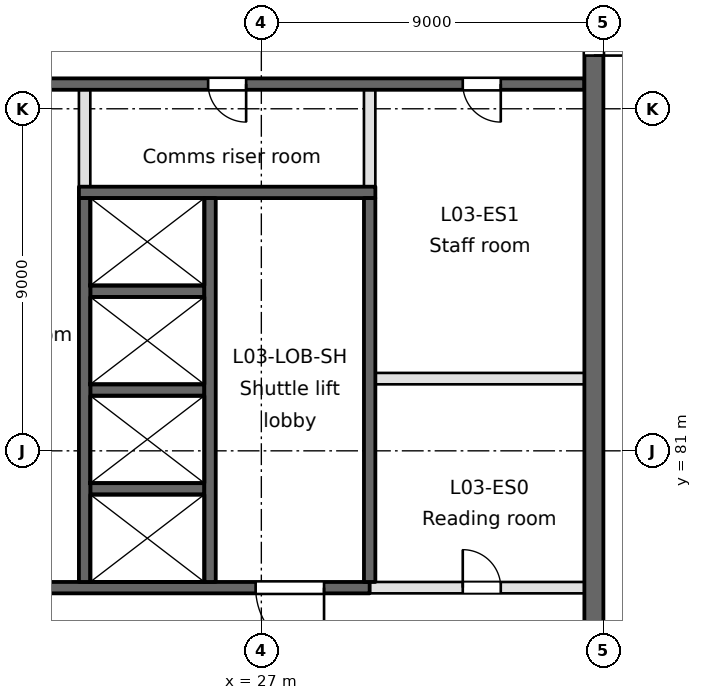
"""IFC4 building model, lengths in metres.
Left out: names, types, materials, properties, quantities, classifications, styles, units other than length and angle.
Written with IfcOpenShell. Run it as: python <this file> out.ifc"""

import sys

from ifc_helpers import new_model, si_unit, direction, frame, frame_2d, origin, place, context, subcontext, project, spatial, rectangle, extrude, element, fill, save


model = new_model("IFC4")
c1 = context("Model", 3, precision=1e-05, world=origin(), true_north=direction((0.0, 1.0)))
c2 = subcontext(c1, "Body", "Model", "MODEL_VIEW")
j1 = project(units=[si_unit("LENGTHUNIT", "METRE"), si_unit("PLANEANGLEUNIT", "RADIAN")], contexts=[c1])
p1 = place(None, origin())
s1 = spatial("IfcSite", under=j1, at=p1, CompositionType="ELEMENT")
p2 = place(p1, origin())
s2 = spatial("IfcBuilding", under=s1, at=p2, CompositionType="ELEMENT")
p3 = place(p2, frame((0.0, 0.0, 16.8)))
s3 = spatial("IfcBuildingStorey", under=s2, at=p3, CompositionType="ELEMENT", Elevation=16.8)
p4 = place(p3, frame((0.9, 77.4, -0.35), z_axis=(0.0, 0.0, 1.0), x_axis=(1.0, 0.0, 0.0)))
e1 = element("IfcWall", 1, at=p4, inside=s3, PredefinedType="SOLIDWALL", context=c2, shape_type="SweptSolid", body=[
    extrude(rectangle(XDim=28.95, YDim=0.3, at=frame_2d((14.475, 0.0))), origin(), (0.0, 0.0, 1.0), 4.8),
])
p5 = place(p4, frame((4.35, 0.0, 0.35)))
e2 = element("IfcOpeningElement", 2, at=p5, cuts=e1, PredefinedType="OPENING", context=c2, shape_type="SweptSolid", body=[
    extrude(rectangle(XDim=1.8, YDim=2.1, at=frame_2d((0.9, 1.05))), frame((0.0, 0.15, 0.0), z_axis=(0.0, -1.0, 0.0), x_axis=(1.0, 0.0, 0.0)), (0.0, 0.0, 1.0), 0.3),
])
p6 = place(p4, frame((25.95, 0.0, 0.35)))
e3 = element("IfcOpeningElement", 3, at=p6, cuts=e1, PredefinedType="OPENING", context=c2, shape_type="SweptSolid", body=[
    extrude(rectangle(XDim=1.8, YDim=2.1, at=frame_2d((0.9, 1.05))), frame((0.0, 0.15, 0.0), z_axis=(0.0, -1.0, 0.0), x_axis=(1.0, 0.0, 0.0)), (0.0, 0.0, 1.0), 0.3),
])
p7 = place(p4, frame((11.95, 0.0, 0.35)))
e4 = element("IfcOpeningElement", 4, at=p7, cuts=e1, PredefinedType="OPENING", context=c2, shape_type="SweptSolid", body=[
    extrude(rectangle(XDim=1.0, YDim=2.1, at=frame_2d((0.5, 1.05))), frame((0.0, 0.15, 0.0), z_axis=(0.0, -1.0, 0.0), x_axis=(1.0, 0.0, 0.0)), (0.0, 0.0, 1.0), 0.3),
])
p8 = place(p4, frame((19.15, 0.0, 0.35)))
e5 = element("IfcOpeningElement", 5, at=p8, cuts=e1, PredefinedType="OPENING", context=c2, shape_type="SweptSolid", body=[
    extrude(rectangle(XDim=1.0, YDim=2.1, at=frame_2d((0.5, 1.05))), frame((0.0, 0.15, 0.0), z_axis=(0.0, -1.0, 0.0), x_axis=(1.0, 0.0, 0.0)), (0.0, 0.0, 1.0), 0.3),
])
p9 = place(p3, frame((29.85, 77.4, 0.0), z_axis=(0.0, 0.0, 1.0), x_axis=(1.0, 0.0, 0.0)))
e6 = element("IfcWall", 6, at=p9, inside=s3, PredefinedType="PARTITIONING", context=c2, shape_type="SweptSolid", body=[
    extrude(rectangle(XDim=5.65, YDim=0.3, at=frame_2d((2.825, 0.0))), origin(), (0.0, 0.0, 1.0), 4.45),
])
p10 = place(p9, frame((2.45, 0.0, 0.0)))
e7 = element("IfcOpeningElement", 7, at=p10, cuts=e6, PredefinedType="OPENING", context=c2, shape_type="SweptSolid", body=[
    extrude(rectangle(XDim=1.0, YDim=2.1, at=frame_2d((0.5, 1.05))), frame((0.0, 0.15, 0.0), z_axis=(0.0, -1.0, 0.0), x_axis=(1.0, 0.0, 0.0)), (0.0, 0.0, 1.0), 0.3),
])
for number, where, z_axis, x_axis in (
    (8, (22.5, 80.0, -0.35), (0.0, 0.0, 1.0), (1.0, 0.0, 0.0)),
    (9, (22.5, 82.6, -0.35), (0.0, 0.0, 1.0), (1.0, 0.0, 0.0)),
):
    element("IfcWall", number, at=place(p3, frame(where, z_axis=z_axis, x_axis=x_axis)), inside=s3, PredefinedType="SOLIDWALL", context=c2, shape_type="SweptSolid", body=[
        extrude(rectangle(XDim=3.0, YDim=0.3, at=frame_2d((1.5, 0.0))), origin(), (0.0, 0.0, 1.0), 4.8),
    ])
p11 = place(p3, frame((30.0, 82.9, 0.0), z_axis=(0.0, 0.0, 1.0), x_axis=(1.0, 0.0, 0.0)))
e10 = element("IfcWall", 10, at=p11, inside=s3, PredefinedType="PARTITIONING", context=c2, shape_type="SweptSolid", body=[
    extrude(rectangle(XDim=5.5, YDim=0.3, at=frame_2d((2.75, 0.0))), origin(), (0.0, 0.0, 1.0), 4.45),
])
p12 = place(p3, frame((22.5, 85.2, -0.35), z_axis=(0.0, 0.0, 1.0), x_axis=(1.0, 0.0, 0.0)))
e11 = element("IfcWall", 11, at=p12, inside=s3, PredefinedType="SOLIDWALL", context=c2, shape_type="SweptSolid", body=[
    extrude(rectangle(XDim=3.0, YDim=0.3, at=frame_2d((1.5, 0.0))), origin(), (0.0, 0.0, 1.0), 4.8),
])
p13 = place(p3, frame((22.2, 87.8, -0.35), z_axis=(0.0, 0.0, 1.0), x_axis=(1.0, 0.0, 0.0)))
e12 = element("IfcWall", 12, at=p13, inside=s3, PredefinedType="SOLIDWALL", context=c2, shape_type="SweptSolid", body=[
    extrude(rectangle(XDim=7.8, YDim=0.3, at=frame_2d((3.9, 0.0))), origin(), (0.0, 0.0, 1.0), 4.8),
])
p14 = place(p3, frame((0.9, 90.65, -0.35), z_axis=(0.0, 0.0, 1.0), x_axis=(1.0, 0.0, 0.0)))
e13 = element("IfcWall", 13, at=p14, inside=s3, PredefinedType="SOLIDWALL", context=c2, shape_type="SweptSolid", body=[
    extrude(rectangle(XDim=34.6, YDim=0.3, at=frame_2d((17.3, 0.0))), origin(), (0.0, 0.0, 1.0), 4.8),
])
p15 = place(p14, frame((4.75, 0.0, 0.35)))
e14 = element("IfcOpeningElement", 14, at=p15, cuts=e13, PredefinedType="OPENING", context=c2, shape_type="SweptSolid", body=[
    extrude(rectangle(XDim=1.0, YDim=2.1, at=frame_2d((0.5, 1.05))), frame((0.0, 0.15, 0.0), z_axis=(0.0, -1.0, 0.0), x_axis=(1.0, 0.0, 0.0)), (0.0, 0.0, 1.0), 0.3),
])
p16 = place(p14, frame((24.7, 0.0, 0.35)))
e15 = element("IfcOpeningElement", 15, at=p16, cuts=e13, PredefinedType="OPENING", context=c2, shape_type="SweptSolid", body=[
    extrude(rectangle(XDim=1.0, YDim=2.1, at=frame_2d((0.5, 1.05))), frame((0.0, 0.15, 0.0), z_axis=(0.0, -1.0, 0.0), x_axis=(1.0, 0.0, 0.0)), (0.0, 0.0, 1.0), 0.3),
])
p17 = place(p14, frame((15.55, 0.0, 0.35)))
e16 = element("IfcOpeningElement", 16, at=p17, cuts=e13, PredefinedType="OPENING", context=c2, shape_type="SweptSolid", body=[
    extrude(rectangle(XDim=1.0, YDim=2.1, at=frame_2d((0.5, 1.05))), frame((0.0, 0.15, 0.0), z_axis=(0.0, -1.0, 0.0), x_axis=(1.0, 0.0, 0.0)), (0.0, 0.0, 1.0), 0.3),
])
p18 = place(p14, frame((31.4, 0.0, 0.35)))
e17 = element("IfcOpeningElement", 17, at=p18, cuts=e13, PredefinedType="OPENING", context=c2, shape_type="SweptSolid", body=[
    extrude(rectangle(XDim=1.0, YDim=2.1, at=frame_2d((0.5, 1.05))), frame((0.0, 0.15, 0.0), z_axis=(0.0, -1.0, 0.0), x_axis=(1.0, 0.0, 0.0)), (0.0, 0.0, 1.0), 0.3),
])
p19 = place(p3, frame((22.35, 77.55, -0.35), z_axis=(0.0, 0.0, 1.0), x_axis=(0.0, 1.0, 0.0)))
e18 = element("IfcWall", 18, at=p19, inside=s3, PredefinedType="SOLIDWALL", context=c2, shape_type="SweptSolid", body=[
    extrude(rectangle(XDim=10.1, YDim=0.3, at=frame_2d((5.05, 0.0))), origin(), (0.0, 0.0, 1.0), 4.8),
])
p20 = place(p3, frame((22.35, 87.95, 0.0), z_axis=(0.0, 0.0, 1.0), x_axis=(0.0, 1.0, 0.0)))
e19 = element("IfcWall", 19, at=p20, inside=s3, PredefinedType="PARTITIONING", context=c2, shape_type="SweptSolid", body=[
    extrude(rectangle(XDim=2.55, YDim=0.3, at=frame_2d((1.275, 0.0))), origin(), (0.0, 0.0, 1.0), 4.45),
])
for number, where, z_axis, x_axis in (
    (20, (25.65, 77.55, -0.35), (0.0, 0.0, 1.0), (0.0, 1.0, 0.0)),
    (21, (29.85, 77.55, -0.35), (0.0, 0.0, 1.0), (0.0, 1.0, 0.0)),
):
    element("IfcWall", number, at=place(p3, frame(where, z_axis=z_axis, x_axis=x_axis)), inside=s3, PredefinedType="SOLIDWALL", context=c2, shape_type="SweptSolid", body=[
        extrude(rectangle(XDim=10.1, YDim=0.3, at=frame_2d((5.05, 0.0))), origin(), (0.0, 0.0, 1.0), 4.8),
    ])
p21 = place(p3, frame((29.85, 87.95, 0.0), z_axis=(0.0, 0.0, 1.0), x_axis=(0.0, 1.0, 0.0)))
e22 = element("IfcWall", 22, at=p21, inside=s3, PredefinedType="PARTITIONING", context=c2, shape_type="SweptSolid", body=[
    extrude(rectangle(XDim=2.55, YDim=0.3, at=frame_2d((1.275, 0.0))), origin(), (0.0, 0.0, 1.0), 4.45),
])
p22 = place(p3, frame((35.75, 63.5, -0.35), z_axis=(0.0, 0.0, 1.0), x_axis=(0.0, 1.0, 0.0)))
e23 = element("IfcWall", 23, at=p22, inside=s3, PredefinedType="SOLIDWALL", context=c2, shape_type="SweptSolid", body=[
    extrude(rectangle(XDim=34.6, YDim=0.5, at=frame_2d((17.3, 0.0))), origin(), (0.0, 0.0, 1.0), 4.8),
])
p23 = place(p22, frame((9.7, 0.0, 0.35)))
e24 = element("IfcOpeningElement", 24, at=p23, cuts=e23, PredefinedType="OPENING", context=c2, shape_type="SweptSolid", body=[
    extrude(rectangle(XDim=2.4, YDim=2.1, at=frame_2d((1.2, 1.05))), frame((0.0, 0.25, 0.0), z_axis=(0.0, -1.0, 0.0), x_axis=(1.0, 0.0, 0.0)), (0.0, 0.0, 1.0), 0.5),
])
p24 = place(p22, frame((27.9, 0.0, 0.35)))
e25 = element("IfcOpeningElement", 25, at=p24, cuts=e23, PredefinedType="OPENING", context=c2, shape_type="SweptSolid", body=[
    extrude(rectangle(XDim=1.5, YDim=2.1, at=frame_2d((0.75, 1.05))), frame((0.0, 0.25, 0.0), z_axis=(0.0, -1.0, 0.0), x_axis=(1.0, 0.0, 0.0)), (0.0, 0.0, 1.0), 0.5),
])
p25 = place(p22, frame((1.5, 0.0, 0.35)))
e26 = element("IfcOpeningElement", 26, at=p25, cuts=e23, PredefinedType="OPENING", context=c2, shape_type="SweptSolid", body=[
    extrude(rectangle(XDim=1.2, YDim=2.1, at=frame_2d((0.6, 1.05))), frame((0.0, 0.25, 0.0), z_axis=(0.0, -1.0, 0.0), x_axis=(1.0, 0.0, 0.0)), (0.0, 0.0, 1.0), 0.5),
])
p26 = place(p6, frame((1.8, 0.0, 0.0), z_axis=(0.0, 0.0, 1.0), x_axis=(-1.0, 0.0, 0.0)))
e27 = element("IfcDoor", 27, at=p26, inside=s3, OperationType="SINGLE_SWING_LEFT", PredefinedType="DOOR", context=c2, shape_type="SweptSolid", body=[
    extrude(rectangle(XDim=1.8, YDim=2.1, at=frame_2d((0.9, 1.05))), frame((0.0, 0.025, 0.0), z_axis=(0.0, -1.0, 0.0), x_axis=(1.0, 0.0, 0.0)), (0.0, 0.0, 1.0), 0.05),
])
fill(e3, e27)
p27 = place(p24, frame((1.5, 0.0, 0.0), z_axis=(0.0, 0.0, 1.0), x_axis=(-1.0, 0.0, 0.0)))
e28 = element("IfcDoor", 28, at=p27, inside=s3, OperationType="SINGLE_SWING_RIGHT", PredefinedType="DOOR", context=c2, shape_type="SweptSolid", body=[
    extrude(rectangle(XDim=1.5, YDim=2.1, at=frame_2d((0.75, 1.05))), frame((0.0, 0.025, 0.0), z_axis=(0.0, -1.0, 0.0), x_axis=(1.0, 0.0, 0.0)), (0.0, 0.0, 1.0), 0.05),
])
fill(e25, e28)
p28 = place(p16, frame((1.0, 0.0, 0.0), z_axis=(0.0, 0.0, 1.0), x_axis=(-1.0, 0.0, 0.0)))
e29 = element("IfcDoor", 29, at=p28, inside=s3, OperationType="SINGLE_SWING_LEFT", PredefinedType="DOOR", context=c2, shape_type="SweptSolid", body=[
    extrude(rectangle(XDim=1.0, YDim=2.1, at=frame_2d((0.5, 1.05))), frame((0.0, 0.025, 0.0), z_axis=(0.0, -1.0, 0.0), x_axis=(1.0, 0.0, 0.0)), (0.0, 0.0, 1.0), 0.05),
])
fill(e15, e29)
p29 = place(p10, origin())
e30 = element("IfcDoor", 30, at=p29, inside=s3, OperationType="SINGLE_SWING_LEFT", PredefinedType="DOOR", context=c2, shape_type="SweptSolid", body=[
    extrude(rectangle(XDim=1.0, YDim=2.1, at=frame_2d((0.5, 1.05))), frame((0.0, 0.025, 0.0), z_axis=(0.0, -1.0, 0.0), x_axis=(1.0, 0.0, 0.0)), (0.0, 0.0, 1.0), 0.05),
])
fill(e7, e30)
p30 = place(p18, frame((1.0, 0.0, 0.0), z_axis=(0.0, 0.0, 1.0), x_axis=(-1.0, 0.0, 0.0)))
e31 = element("IfcDoor", 31, at=p30, inside=s3, OperationType="SINGLE_SWING_LEFT", PredefinedType="DOOR", context=c2, shape_type="SweptSolid", body=[
    extrude(rectangle(XDim=1.0, YDim=2.1, at=frame_2d((0.5, 1.05))), frame((0.0, 0.025, 0.0), z_axis=(0.0, -1.0, 0.0), x_axis=(1.0, 0.0, 0.0)), (0.0, 0.0, 1.0), 0.05),
])
fill(e17, e31)
save(model, sys.argv[1])
